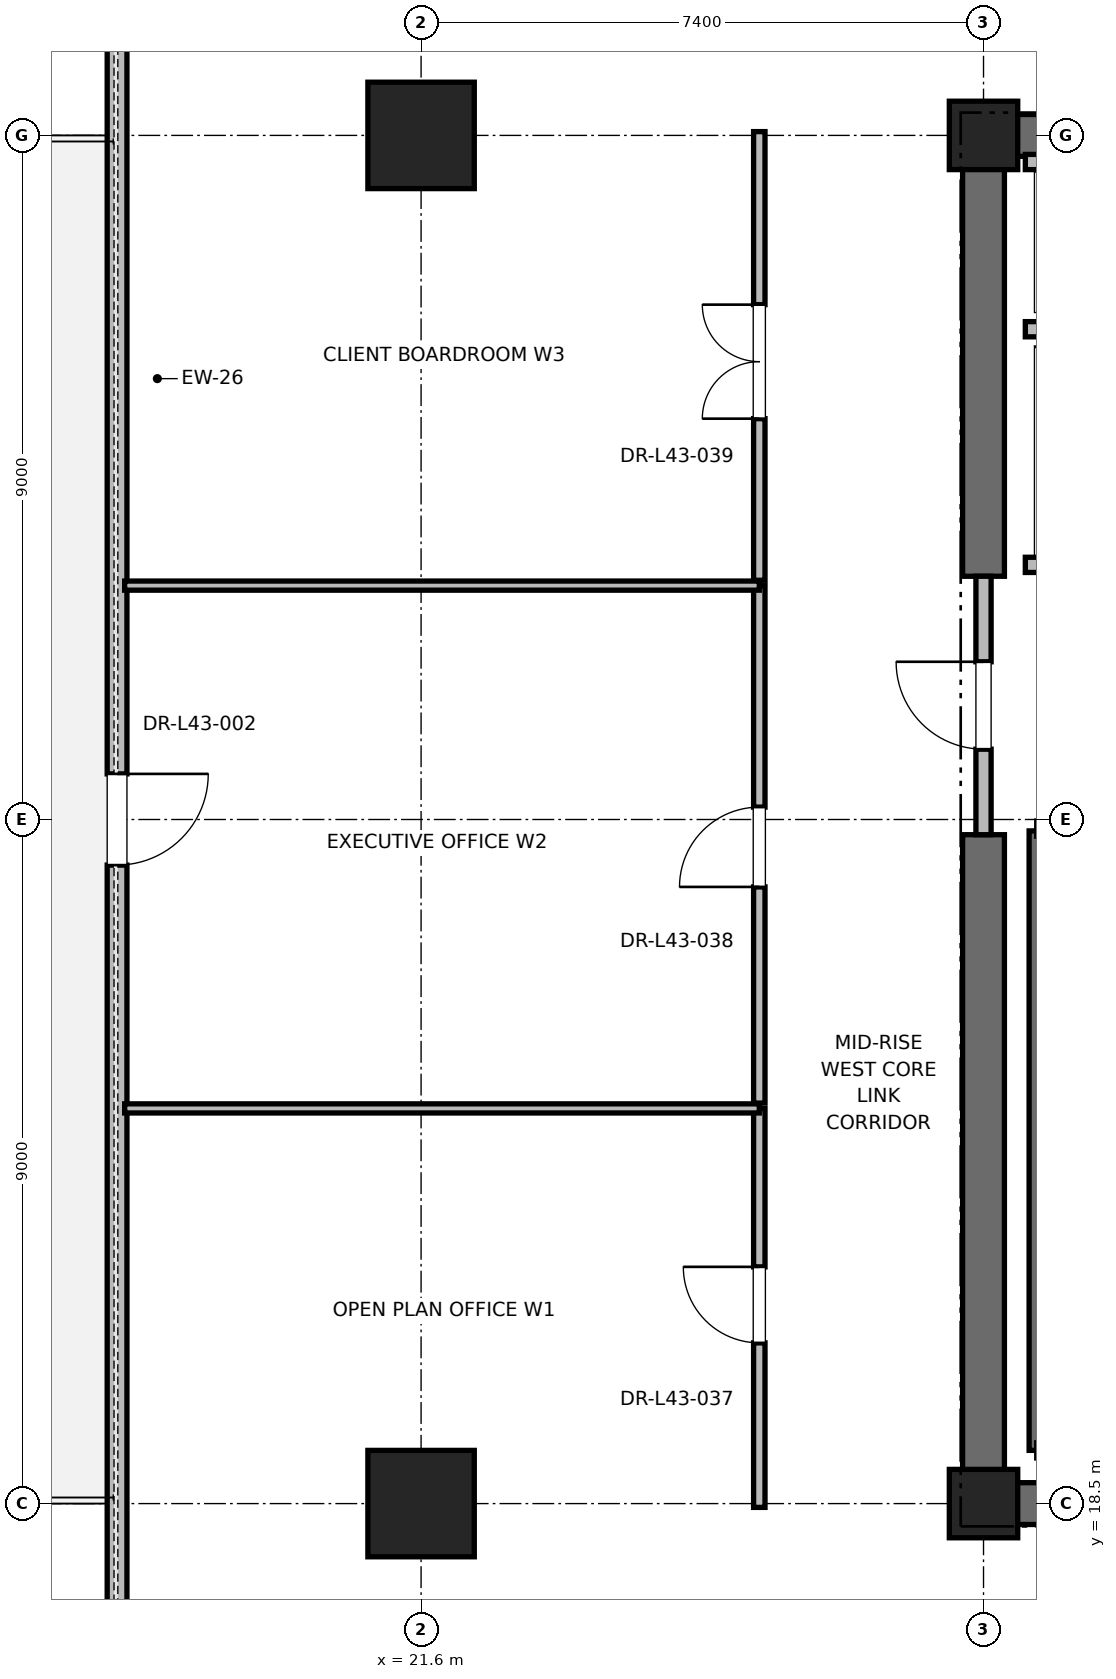
"""IFC4 building model, lengths in metres.
Left out: names, types, materials, properties, quantities, classifications, styles, units other than length and angle.
Written with IfcOpenShell. Run it as: python <this file> out.ifc"""

import sys

from ifc_helpers import new_model, si_unit, direction, frame, frame_2d, origin, origin_2d, place, context, subcontext, project, spatial, rectangle, extrude, element, fill, save


model = new_model("IFC4")
c1 = context("Model", 3, precision=1e-05, world=origin(), true_north=direction((0.0, 1.0)))
c2 = subcontext(c1, "Body", "Model", "MODEL_VIEW")
j1 = project(units=[si_unit("LENGTHUNIT", "METRE"), si_unit("PLANEANGLEUNIT", "RADIAN")], contexts=[c1])
p1 = place(None, origin())
s1 = spatial("IfcSite", under=j1, at=p1, CompositionType="ELEMENT")
p2 = place(p1, origin())
s2 = spatial("IfcBuilding", under=s1, at=p2, CompositionType="ELEMENT")
p3 = place(p2, frame((0.0, 0.0, 184.4)))
s3 = spatial("IfcBuildingStorey", under=s2, at=p3, CompositionType="ELEMENT", Elevation=184.4)
for number, where, z_axis, x_axis in (
    (1, (21.6, 18.5, 0.0), (0.0, 0.0, 1.0), (1.0, 0.0, 0.0)),
    (2, (21.6, 36.5, 0.0), (0.0, 0.0, 1.0), (1.0, 0.0, 0.0)),
):
    element("IfcColumn", number, at=place(p3, frame(where, z_axis=z_axis, x_axis=x_axis)), inside=s3, PredefinedType="COLUMN", context=c2, shape_type="SweptSolid", body=[
        extrude(rectangle(XDim=1.4, YDim=1.4, at=origin_2d()), origin(), (0.0, 0.0, 1.0), 5.0),
    ])
for number, where, z_axis, x_axis in (
    (3, (29.0, 18.5, 0.0), (0.0, 0.0, 1.0), (1.0, 0.0, 0.0)),
    (4, (29.0, 36.5, 0.0), (0.0, 0.0, 1.0), (1.0, 0.0, 0.0)),
):
    element("IfcColumn", number, at=place(p3, frame(where, z_axis=z_axis, x_axis=x_axis)), inside=s3, PredefinedType="PILASTER", context=c2, shape_type="SweptSolid", body=[
        extrude(rectangle(XDim=0.9, YDim=0.9, at=origin_2d()), origin(), (0.0, 0.0, 1.0), 5.0),
    ])
p4 = place(p3, frame((29.0, 18.5, 0.0), z_axis=(0.0, 0.0, 1.0), x_axis=(1.0, 0.0, 0.0)))
e5 = element("IfcWall", 5, at=p4, inside=s3, PredefinedType="SHEAR", context=c2, shape_type="SweptSolid", body=[
    extrude(rectangle(XDim=9.2, YDim=0.55, at=frame_2d((4.6, 0.0))), origin(), (0.0, 0.0, 1.0), 4.7),
])
p5 = place(p3, frame((29.0, 36.5, 0.0), z_axis=(0.0, 0.0, 1.0), x_axis=(1.0, 0.0, 0.0)))
e6 = element("IfcWall", 6, at=p5, inside=s3, PredefinedType="SHEAR", context=c2, shape_type="SweptSolid", body=[
    extrude(rectangle(XDim=5.8, YDim=0.55, at=frame_2d((2.9, 0.0))), origin(), (0.0, 0.0, 1.0), 4.7),
])
p6 = place(p3, frame((29.0, 18.5, 0.0), z_axis=(0.0, 0.0, 1.0), x_axis=(0.0, 1.0, 0.0)))
e7 = element("IfcWall", 7, at=p6, inside=s3, PredefinedType="SHEAR", context=c2, shape_type="SweptSolid", body=[
    extrude(rectangle(XDim=8.8, YDim=0.55, at=frame_2d((4.4, 0.0))), origin(), (0.0, 0.0, 1.0), 4.7),
])
p7 = place(p3, frame((29.0, 30.7, 0.0), z_axis=(0.0, 0.0, 1.0), x_axis=(0.0, 1.0, 0.0)))
e8 = element("IfcWall", 8, at=p7, inside=s3, PredefinedType="SHEAR", context=c2, shape_type="SweptSolid", body=[
    extrude(rectangle(XDim=5.8, YDim=0.55, at=frame_2d((2.9, 0.0))), origin(), (0.0, 0.0, 1.0), 4.7),
])
p8 = place(p3, frame((17.6, 44.7, 0.0), z_axis=(0.0, 0.0, 1.0), x_axis=(0.0, -1.0, 0.0)))
e9 = element("IfcWall", 9, at=p8, inside=s3, PredefinedType="PARAPET", context=c2, shape_type="SweptSolid", body=[
    extrude(rectangle(XDim=34.4, YDim=0.26, at=frame_2d((17.2, 0.0))), origin(), (0.0, 0.0, 1.0), 3.753),
])
p9 = place(p8, frame((4.2, 0.0, 0.85)))
e10 = element("IfcOpeningElement", 10, at=p9, cuts=e9, PredefinedType="OPENING", context=c2, shape_type="SweptSolid", body=[
    extrude(rectangle(XDim=2.0, YDim=2.3, at=frame_2d((1.0, 1.15))), frame((0.0, 0.13, 0.0), z_axis=(0.0, -1.0, 0.0), x_axis=(1.0, 0.0, 0.0)), (0.0, 0.0, 1.0), 0.26),
])
p10 = place(p8, frame((16.6, 0.0, 0.0)))
e11 = element("IfcOpeningElement", 11, at=p10, cuts=e9, PredefinedType="OPENING", context=c2, shape_type="SweptSolid", body=[
    extrude(rectangle(XDim=1.2, YDim=2.2, at=frame_2d((0.6, 1.1))), frame((0.0, 0.13, 0.0), z_axis=(0.0, -1.0, 0.0), x_axis=(1.0, 0.0, 0.0)), (0.0, 0.0, 1.0), 0.26),
])
p11 = place(p8, frame((28.2, 0.0, 0.85)))
e12 = element("IfcOpeningElement", 12, at=p11, cuts=e9, PredefinedType="OPENING", context=c2, shape_type="SweptSolid", body=[
    extrude(rectangle(XDim=2.0, YDim=2.3, at=frame_2d((1.0, 1.15))), frame((0.0, 0.13, 0.0), z_axis=(0.0, -1.0, 0.0), x_axis=(1.0, 0.0, 0.0)), (0.0, 0.0, 1.0), 0.26),
])
p12 = place(p3, frame((29.7, 19.2, 0.0), z_axis=(0.0, 0.0, 1.0), x_axis=(0.0, 1.0, 0.0)))
e13 = element("IfcWall", 13, at=p12, inside=s3, PredefinedType="SOLIDWALL", context=c2, shape_type="SweptSolid", body=[
    extrude(rectangle(XDim=8.15, YDim=0.2, at=frame_2d((4.075, 0.0))), origin(), (0.0, 0.0, 1.0), 4.7),
])
p13 = place(p3, frame((29.0, 27.3, 0.0), z_axis=(0.0, 0.0, 1.0), x_axis=(0.0, 1.0, 0.0)))
e14 = element("IfcWall", 14, at=p13, inside=s3, PredefinedType="PARTITIONING", context=c2, shape_type="SweptSolid", body=[
    extrude(rectangle(XDim=3.4, YDim=0.2, at=frame_2d((1.7, 0.0))), origin(), (0.0, 0.0, 1.0), 3.68),
])
p14 = place(p13, frame((1.125, 0.0, 0.0)))
e15 = element("IfcOpeningElement", 15, at=p14, cuts=e14, PredefinedType="OPENING", context=c2, shape_type="SweptSolid", body=[
    extrude(rectangle(XDim=1.15, YDim=2.2, at=frame_2d((0.575, 1.1))), frame((0.0, 0.1, 0.0), z_axis=(0.0, -1.0, 0.0), x_axis=(1.0, 0.0, 0.0)), (0.0, 0.0, 1.0), 0.2),
])
p15 = place(p3, frame((29.55, 30.85, 0.0), z_axis=(0.0, 0.0, 1.0), x_axis=(1.0, 0.0, 0.0)))
e16 = element("IfcWall", 16, at=p15, inside=s3, PredefinedType="SOLIDWALL", context=c2, shape_type="SweptSolid", body=[
    extrude(rectangle(XDim=2.6, YDim=0.2, at=frame_2d((1.3, 0.0))), origin(), (0.0, 0.0, 1.0), 3.68),
])
p16 = place(p15, frame((0.75, 0.0, 0.0)))
e17 = element("IfcOpeningElement", 17, at=p16, cuts=e16, PredefinedType="OPENING", context=c2, shape_type="SweptSolid", body=[
    extrude(rectangle(XDim=1.1, YDim=2.2, at=frame_2d((0.55, 1.1))), frame((0.0, 0.1, 0.0), z_axis=(0.0, -1.0, 0.0), x_axis=(1.0, 0.0, 0.0)), (0.0, 0.0, 1.0), 0.2),
])
p17 = place(p3, frame((29.55, 33.95, 0.0), z_axis=(0.0, 0.0, 1.0), x_axis=(1.0, 0.0, 0.0)))
e18 = element("IfcWall", 18, at=p17, inside=s3, PredefinedType="SOLIDWALL", context=c2, shape_type="SweptSolid", body=[
    extrude(rectangle(XDim=2.8, YDim=0.2, at=frame_2d((1.4, 0.0))), origin(), (0.0, 0.0, 1.0), 4.7),
])
p18 = place(p3, frame((32.35, 36.15, 0.0), z_axis=(0.0, 0.0, 1.0), x_axis=(-1.0, 0.0, 0.0)))
e19 = element("IfcWall", 19, at=p18, inside=s3, PredefinedType="SOLIDWALL", context=c2, shape_type="SweptSolid", body=[
    extrude(rectangle(XDim=2.8, YDim=0.2, at=frame_2d((1.4, 0.0))), origin(), (0.0, 0.0, 1.0), 3.753),
])
p19 = place(p3, frame((26.05, 18.45, 0.0), z_axis=(0.0, 0.0, 1.0), x_axis=(0.0, 1.0, 0.0)))
e20 = element("IfcWall", 20, at=p19, inside=s3, PredefinedType="PARTITIONING", context=c2, shape_type="SweptSolid", body=[
    extrude(rectangle(XDim=5.249, YDim=0.15, at=frame_2d((2.625, 0.0))), origin(), (0.0, 0.0, 1.0), 2.85),
])
p20 = place(p19, frame((2.165, 0.0, 0.0)))
e21 = element("IfcOpeningElement", 21, at=p20, cuts=e20, PredefinedType="OPENING", context=c2, shape_type="SweptSolid", body=[
    extrude(rectangle(XDim=1.0, YDim=2.15, at=frame_2d((0.5, 1.075))), frame((0.0, 0.075, 0.0), z_axis=(0.0, -1.0, 0.0), x_axis=(1.0, 0.0, 0.0)), (0.0, 0.0, 1.0), 0.15),
])
p21 = place(p3, frame((17.7, 23.699, 0.0), z_axis=(0.0, 0.0, 1.0), x_axis=(1.0, 0.0, 0.0)))
e22 = element("IfcWall", 22, at=p21, inside=s3, PredefinedType="PARTITIONING", context=c2, shape_type="SweptSolid", body=[
    extrude(rectangle(XDim=8.35, YDim=0.12, at=frame_2d((4.175, 0.0))), origin(), (0.0, 0.0, 1.0), 2.85),
])
p22 = place(p3, frame((26.05, 23.769, 0.0), z_axis=(0.0, 0.0, 1.0), x_axis=(0.0, 1.0, 0.0)))
e23 = element("IfcWall", 23, at=p22, inside=s3, PredefinedType="PARTITIONING", context=c2, shape_type="SweptSolid", body=[
    extrude(rectangle(XDim=6.808, YDim=0.15, at=frame_2d((3.404, 0.0))), origin(), (0.0, 0.0, 1.0), 2.85),
])
p23 = place(p22, frame((2.844, 0.0, 0.0)))
e24 = element("IfcOpeningElement", 24, at=p23, cuts=e23, PredefinedType="OPENING", context=c2, shape_type="SweptSolid", body=[
    extrude(rectangle(XDim=1.05, YDim=2.2, at=frame_2d((0.525, 1.1))), frame((0.0, 0.075, 0.0), z_axis=(0.0, -1.0, 0.0), x_axis=(1.0, 0.0, 0.0)), (0.0, 0.0, 1.0), 0.15),
])
p24 = place(p3, frame((17.7, 30.577, 0.0), z_axis=(0.0, 0.0, 1.0), x_axis=(1.0, 0.0, 0.0)))
e25 = element("IfcWall", 25, at=p24, inside=s3, PredefinedType="PARTITIONING", context=c2, shape_type="SweptSolid", body=[
    extrude(rectangle(XDim=8.35, YDim=0.12, at=frame_2d((4.175, 0.0))), origin(), (0.0, 0.0, 1.0), 2.85),
])
p25 = place(p3, frame((26.05, 30.647, 0.0), z_axis=(0.0, 0.0, 1.0), x_axis=(0.0, 1.0, 0.0)))
e26 = element("IfcWall", 26, at=p25, inside=s3, PredefinedType="PARTITIONING", context=c2, shape_type="SweptSolid", body=[
    extrude(rectangle(XDim=5.903, YDim=0.15, at=frame_2d((2.952, 0.0))), origin(), (0.0, 0.0, 1.0), 2.85),
])
p26 = place(p25, frame((2.126, 0.0, 0.0)))
e27 = element("IfcOpeningElement", 27, at=p26, cuts=e26, PredefinedType="OPENING", context=c2, shape_type="SweptSolid", body=[
    extrude(rectangle(XDim=1.5, YDim=2.25, at=frame_2d((0.75, 1.125))), frame((0.0, 0.075, 0.0), z_axis=(0.0, -1.0, 0.0), x_axis=(1.0, 0.0, 0.0)), (0.0, 0.0, 1.0), 0.15),
])
p27 = place(p10, origin())
e28 = element("IfcDoor", 28, at=p27, inside=s3, OperationType="SINGLE_SWING_LEFT", PredefinedType="DOOR", context=c2, shape_type="SweptSolid", body=[
    extrude(rectangle(XDim=1.2, YDim=2.2, at=frame_2d((0.6, 1.1))), frame((0.0, 0.025, 0.0), z_axis=(0.0, -1.0, 0.0), x_axis=(1.0, 0.0, 0.0)), (0.0, 0.0, 1.0), 0.05),
])
fill(e11, e28)
p28 = place(p14, origin())
e29 = element("IfcDoor", 29, at=p28, inside=s3, OperationType="SINGLE_SWING_RIGHT", PredefinedType="DOOR", context=c2, shape_type="SweptSolid", body=[
    extrude(rectangle(XDim=1.15, YDim=2.2, at=frame_2d((0.575, 1.1))), frame((0.0, 0.025, 0.0), z_axis=(0.0, -1.0, 0.0), x_axis=(1.0, 0.0, 0.0)), (0.0, 0.0, 1.0), 0.05),
])
fill(e15, e29)
p29 = place(p20, origin())
e30 = element("IfcDoor", 30, at=p29, inside=s3, OperationType="SINGLE_SWING_RIGHT", PredefinedType="DOOR", context=c2, shape_type="SweptSolid", body=[
    extrude(rectangle(XDim=1.0, YDim=2.15, at=frame_2d((0.5, 1.075))), frame((0.0, 0.025, 0.0), z_axis=(0.0, -1.0, 0.0), x_axis=(1.0, 0.0, 0.0)), (0.0, 0.0, 1.0), 0.05),
])
fill(e21, e30)
p30 = place(p23, origin())
e31 = element("IfcDoor", 31, at=p30, inside=s3, OperationType="SINGLE_SWING_LEFT", PredefinedType="DOOR", context=c2, shape_type="SweptSolid", body=[
    extrude(rectangle(XDim=1.05, YDim=2.2, at=frame_2d((0.525, 1.1))), frame((0.0, 0.025, 0.0), z_axis=(0.0, -1.0, 0.0), x_axis=(1.0, 0.0, 0.0)), (0.0, 0.0, 1.0), 0.05),
])
fill(e24, e31)
p31 = place(p26, origin())
e32 = element("IfcDoor", 32, at=p31, inside=s3, OperationType="DOUBLE_DOOR_SINGLE_SWING", PredefinedType="DOOR", context=c2, shape_type="SweptSolid", body=[
    extrude(rectangle(XDim=1.5, YDim=2.25, at=frame_2d((0.75, 1.125))), frame((0.0, 0.025, 0.0), z_axis=(0.0, -1.0, 0.0), x_axis=(1.0, 0.0, 0.0)), (0.0, 0.0, 1.0), 0.05),
])
fill(e27, e32)
save(model, sys.argv[1])
